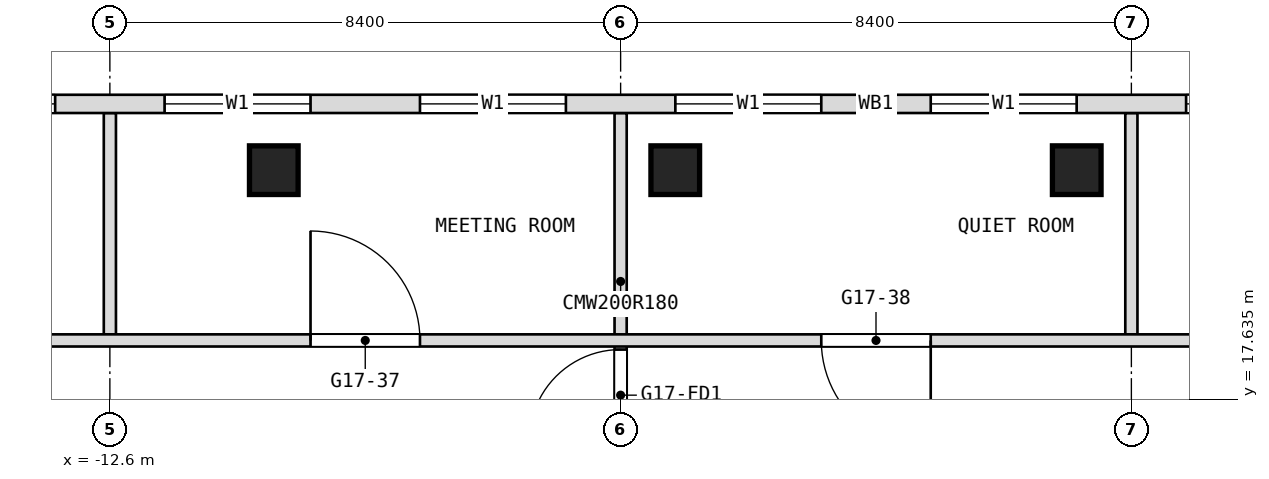
"""IFC4 building model, lengths in metres.
Left out: names, types, materials, properties, quantities, classifications, styles, units other than length and angle.
Written with IfcOpenShell. Run it as: python <this file> out.ifc"""

import sys

from ifc_helpers import new_model, si_unit, direction, frame, frame_2d, origin, origin_2d, place, context, subcontext, project, spatial, rectangle, extrude, element, fill, save


model = new_model("IFC4")
c1 = context("Model", 3, precision=1e-05, world=origin(), true_north=direction((0.0, 1.0)))
c2 = subcontext(c1, "Body", "Model", "MODEL_VIEW")
j1 = project(units=[si_unit("LENGTHUNIT", "METRE"), si_unit("PLANEANGLEUNIT", "RADIAN")], contexts=[c1])
p1 = place(None, origin())
s1 = spatial("IfcSite", under=j1, at=p1, CompositionType="ELEMENT")
p2 = place(p1, origin())
s2 = spatial("IfcBuilding", under=s1, at=p2, CompositionType="ELEMENT")
p3 = place(p2, frame((0.0, 0.0, 209.3)))
s3 = spatial("IfcBuildingStorey", under=s2, at=p3, CompositionType="ELEMENT", Elevation=209.3)
for number, where, z_axis, x_axis in (
    (1, (-9.904, 21.4, 0.0), (0.0, 0.0, 1.0), (1.0, 0.0, 0.0)),
    (2, (-3.302, 21.4, 0.0), (0.0, 0.0, 1.0), (1.0, 0.0, 0.0)),
    (3, (3.302, 21.4, 0.0), (0.0, 0.0, 1.0), (1.0, 0.0, 0.0)),
):
    element("IfcColumn", number, at=place(p3, frame(where, z_axis=z_axis, x_axis=x_axis)), inside=s3, PredefinedType="COLUMN", context=c2, shape_type="SweptSolid", body=[
        extrude(rectangle(XDim=0.8, YDim=0.8, at=origin_2d()), origin(), (0.0, 0.0, 1.0), 3.6),
    ])
p4 = place(p3, frame((4.2, 18.7, 0.0), z_axis=(0.0, 0.0, 1.0), x_axis=(0.0, 1.0, 0.0)))
e4 = element("IfcWall", 4, at=p4, inside=s3, PredefinedType="PARTITIONING", context=c2, shape_type="SweptSolid", body=[
    extrude(rectangle(XDim=3.64, YDim=0.2, at=frame_2d((1.82, 0.0))), origin(), (0.0, 0.0, 1.0), 3.34),
])
p5 = place(p3, frame((-4.2, 16.8, 0.0), z_axis=(0.0, 0.0, 1.0), x_axis=(0.0, 1.0, 0.0)))
e5 = element("IfcWall", 5, at=p5, inside=s3, PredefinedType="PARTITIONING", context=c2, shape_type="SweptSolid", body=[
    extrude(rectangle(XDim=5.54, YDim=0.2, at=frame_2d((2.77, 0.0))), origin(), (0.0, 0.0, 1.0), 3.34),
])
p6 = place(p5, frame((0.15, 0.0, 0.0)))
e6 = element("IfcOpeningElement", 6, at=p6, cuts=e5, PredefinedType="OPENING", context=c2, shape_type="SweptSolid", body=[
    extrude(rectangle(XDim=1.5, YDim=2.1, at=frame_2d((0.75, 1.05))), frame((0.0, 0.1, 0.0), z_axis=(0.0, -1.0, 0.0), x_axis=(1.0, 0.0, 0.0)), (0.0, 0.0, 1.0), 0.2),
])
p7 = place(p3, frame((-12.6, 18.7, 0.0), z_axis=(0.0, 0.0, 1.0), x_axis=(0.0, 1.0, 0.0)))
e7 = element("IfcWall", 7, at=p7, inside=s3, PredefinedType="PARTITIONING", context=c2, shape_type="SweptSolid", body=[
    extrude(rectangle(XDim=3.64, YDim=0.2, at=frame_2d((1.82, 0.0))), origin(), (0.0, 0.0, 1.0), 3.34),
])
p8 = place(p3, frame((-16.9, 18.6, 0.0), z_axis=(0.0, 0.0, 1.0), x_axis=(1.0, 0.0, 0.0)))
e8 = element("IfcWall", 8, at=p8, inside=s3, PredefinedType="PARTITIONING", context=c2, shape_type="SweptSolid", body=[
    extrude(rectangle(XDim=33.8, YDim=0.2, at=frame_2d((16.9, 0.0))), origin(), (0.0, 0.0, 1.0), 3.34),
])
p9 = place(p8, frame((1.7, 0.0, 0.0)))
e9 = element("IfcOpeningElement", 9, at=p9, cuts=e8, PredefinedType="OPENING", context=c2, shape_type="SweptSolid", body=[
    extrude(rectangle(XDim=1.0, YDim=2.1, at=frame_2d((0.5, 1.05))), frame((0.0, 0.1, 0.0), z_axis=(0.0, -1.0, 0.0), x_axis=(1.0, 0.0, 0.0)), (0.0, 0.0, 1.0), 0.2),
])
p10 = place(p8, frame((7.6, 0.0, 0.0)))
e10 = element("IfcOpeningElement", 10, at=p10, cuts=e8, PredefinedType="OPENING", context=c2, shape_type="SweptSolid", body=[
    extrude(rectangle(XDim=1.8, YDim=2.1, at=frame_2d((0.9, 1.05))), frame((0.0, 0.1, 0.0), z_axis=(0.0, -1.0, 0.0), x_axis=(1.0, 0.0, 0.0)), (0.0, 0.0, 1.0), 0.2),
])
p11 = place(p8, frame((16.0, 0.0, 0.0)))
e11 = element("IfcOpeningElement", 11, at=p11, cuts=e8, PredefinedType="OPENING", context=c2, shape_type="SweptSolid", body=[
    extrude(rectangle(XDim=1.8, YDim=2.1, at=frame_2d((0.9, 1.05))), frame((0.0, 0.1, 0.0), z_axis=(0.0, -1.0, 0.0), x_axis=(1.0, 0.0, 0.0)), (0.0, 0.0, 1.0), 0.2),
])
p12 = place(p8, frame((24.4, 0.0, 0.0)))
e12 = element("IfcOpeningElement", 12, at=p12, cuts=e8, PredefinedType="OPENING", context=c2, shape_type="SweptSolid", body=[
    extrude(rectangle(XDim=1.8, YDim=2.1, at=frame_2d((0.9, 1.05))), frame((0.0, 0.1, 0.0), z_axis=(0.0, -1.0, 0.0), x_axis=(1.0, 0.0, 0.0)), (0.0, 0.0, 1.0), 0.2),
])
p13 = place(p8, frame((31.1, 0.0, 0.0)))
e13 = element("IfcOpeningElement", 13, at=p13, cuts=e8, PredefinedType="OPENING", context=c2, shape_type="SweptSolid", body=[
    extrude(rectangle(XDim=1.0, YDim=2.1, at=frame_2d((0.5, 1.05))), frame((0.0, 0.1, 0.0), z_axis=(0.0, -1.0, 0.0), x_axis=(1.0, 0.0, 0.0)), (0.0, 0.0, 1.0), 0.2),
])
p14 = place(p3, frame((19.206, 22.49, 0.0), z_axis=(0.0, 0.0, 1.0), x_axis=(-1.0, 0.0, 0.0)))
e14 = element("IfcWall", 14, at=p14, inside=s3, PredefinedType="NOTDEFINED", context=c2, shape_type="SweptSolid", body=[
    extrude(rectangle(XDim=38.412, YDim=0.3, at=frame_2d((19.206, 0.0))), origin(), (0.0, 0.0, 1.0), 3.6),
])
p15 = place(p14, frame((3.306, 0.0, 0.9)))
e15 = element("IfcOpeningElement", 15, at=p15, cuts=e14, PredefinedType="OPENING", context=c2, shape_type="SweptSolid", body=[
    extrude(rectangle(XDim=2.4, YDim=2.1, at=frame_2d((1.2, 1.05))), frame((0.0, 0.15, 0.0), z_axis=(0.0, -1.0, 0.0), x_axis=(1.0, 0.0, 0.0)), (0.0, 0.0, 1.0), 0.3),
])
p16 = place(p14, frame((7.506, 0.0, 0.9)))
e16 = element("IfcOpeningElement", 16, at=p16, cuts=e14, PredefinedType="OPENING", context=c2, shape_type="SweptSolid", body=[
    extrude(rectangle(XDim=2.4, YDim=2.1, at=frame_2d((1.2, 1.05))), frame((0.0, 0.15, 0.0), z_axis=(0.0, -1.0, 0.0), x_axis=(1.0, 0.0, 0.0)), (0.0, 0.0, 1.0), 0.3),
])
p17 = place(p14, frame((11.706, 0.0, 0.9)))
e17 = element("IfcOpeningElement", 17, at=p17, cuts=e14, PredefinedType="OPENING", context=c2, shape_type="SweptSolid", body=[
    extrude(rectangle(XDim=2.4, YDim=2.1, at=frame_2d((1.2, 1.05))), frame((0.0, 0.15, 0.0), z_axis=(0.0, -1.0, 0.0), x_axis=(1.0, 0.0, 0.0)), (0.0, 0.0, 1.0), 0.3),
])
p18 = place(p14, frame((15.906, 0.0, 0.9)))
e18 = element("IfcOpeningElement", 18, at=p18, cuts=e14, PredefinedType="OPENING", context=c2, shape_type="SweptSolid", body=[
    extrude(rectangle(XDim=2.4, YDim=2.1, at=frame_2d((1.2, 1.05))), frame((0.0, 0.15, 0.0), z_axis=(0.0, -1.0, 0.0), x_axis=(1.0, 0.0, 0.0)), (0.0, 0.0, 1.0), 0.3),
])
p19 = place(p14, frame((20.106, 0.0, 0.9)))
e19 = element("IfcOpeningElement", 19, at=p19, cuts=e14, PredefinedType="OPENING", context=c2, shape_type="SweptSolid", body=[
    extrude(rectangle(XDim=2.4, YDim=2.1, at=frame_2d((1.2, 1.05))), frame((0.0, 0.15, 0.0), z_axis=(0.0, -1.0, 0.0), x_axis=(1.0, 0.0, 0.0)), (0.0, 0.0, 1.0), 0.3),
])
p20 = place(p14, frame((24.306, 0.0, 0.9)))
e20 = element("IfcOpeningElement", 20, at=p20, cuts=e14, PredefinedType="OPENING", context=c2, shape_type="SweptSolid", body=[
    extrude(rectangle(XDim=2.4, YDim=2.1, at=frame_2d((1.2, 1.05))), frame((0.0, 0.15, 0.0), z_axis=(0.0, -1.0, 0.0), x_axis=(1.0, 0.0, 0.0)), (0.0, 0.0, 1.0), 0.3),
])
p21 = place(p14, frame((28.506, 0.0, 0.9)))
e21 = element("IfcOpeningElement", 21, at=p21, cuts=e14, PredefinedType="OPENING", context=c2, shape_type="SweptSolid", body=[
    extrude(rectangle(XDim=2.4, YDim=2.1, at=frame_2d((1.2, 1.05))), frame((0.0, 0.15, 0.0), z_axis=(0.0, -1.0, 0.0), x_axis=(1.0, 0.0, 0.0)), (0.0, 0.0, 1.0), 0.3),
])
p22 = place(p14, frame((32.706, 0.0, 0.9)))
e22 = element("IfcOpeningElement", 22, at=p22, cuts=e14, PredefinedType="OPENING", context=c2, shape_type="SweptSolid", body=[
    extrude(rectangle(XDim=2.4, YDim=2.1, at=frame_2d((1.2, 1.05))), frame((0.0, 0.15, 0.0), z_axis=(0.0, -1.0, 0.0), x_axis=(1.0, 0.0, 0.0)), (0.0, 0.0, 1.0), 0.3),
])
p23 = place(p10, origin())
e23 = element("IfcDoor", 23, at=p23, inside=s3, OperationType="DOUBLE_DOOR_SINGLE_SWING", PredefinedType="DOOR", context=c2, shape_type="SweptSolid", body=[
    extrude(rectangle(XDim=1.8, YDim=2.1, at=frame_2d((0.9, 1.05))), frame((0.0, 0.025, 0.0), z_axis=(0.0, -1.0, 0.0), x_axis=(1.0, 0.0, 0.0)), (0.0, 0.0, 1.0), 0.05),
])
fill(e10, e23)
p24 = place(p11, origin())
e24 = element("IfcDoor", 24, at=p24, inside=s3, OperationType="DOUBLE_DOOR_SINGLE_SWING", PredefinedType="DOOR", context=c2, shape_type="SweptSolid", body=[
    extrude(rectangle(XDim=1.8, YDim=2.1, at=frame_2d((0.9, 1.05))), frame((0.0, 0.025, 0.0), z_axis=(0.0, -1.0, 0.0), x_axis=(1.0, 0.0, 0.0)), (0.0, 0.0, 1.0), 0.05),
])
fill(e11, e24)
p25 = place(p17, origin())
e25 = element("IfcWindow", 25, at=p25, inside=s3, PartitioningType="SINGLE_PANEL", PredefinedType="WINDOW", context=c2, shape_type="SweptSolid", body=[
    extrude(rectangle(XDim=2.4, YDim=2.1, at=frame_2d((1.2, 1.05))), frame((0.0, 0.03, 0.0), z_axis=(0.0, -1.0, 0.0), x_axis=(1.0, 0.0, 0.0)), (0.0, 0.0, 1.0), 0.06),
])
fill(e17, e25)
p26 = place(p18, origin())
e26 = element("IfcWindow", 26, at=p26, inside=s3, PartitioningType="SINGLE_PANEL", PredefinedType="WINDOW", context=c2, shape_type="SweptSolid", body=[
    extrude(rectangle(XDim=2.4, YDim=2.1, at=frame_2d((1.2, 1.05))), frame((0.0, 0.03, 0.0), z_axis=(0.0, -1.0, 0.0), x_axis=(1.0, 0.0, 0.0)), (0.0, 0.0, 1.0), 0.06),
])
fill(e18, e26)
p27 = place(p19, origin())
e27 = element("IfcWindow", 27, at=p27, inside=s3, PartitioningType="SINGLE_PANEL", PredefinedType="WINDOW", context=c2, shape_type="SweptSolid", body=[
    extrude(rectangle(XDim=2.4, YDim=2.1, at=frame_2d((1.2, 1.05))), frame((0.0, 0.03, 0.0), z_axis=(0.0, -1.0, 0.0), x_axis=(1.0, 0.0, 0.0)), (0.0, 0.0, 1.0), 0.06),
])
fill(e19, e27)
p28 = place(p20, origin())
e28 = element("IfcWindow", 28, at=p28, inside=s3, PartitioningType="SINGLE_PANEL", PredefinedType="WINDOW", context=c2, shape_type="SweptSolid", body=[
    extrude(rectangle(XDim=2.4, YDim=2.1, at=frame_2d((1.2, 1.05))), frame((0.0, 0.03, 0.0), z_axis=(0.0, -1.0, 0.0), x_axis=(1.0, 0.0, 0.0)), (0.0, 0.0, 1.0), 0.06),
])
fill(e20, e28)
p29 = place(p21, origin())
e29 = element("IfcWindow", 29, at=p29, inside=s3, PartitioningType="SINGLE_PANEL", PredefinedType="WINDOW", context=c2, shape_type="SweptSolid", body=[
    extrude(rectangle(XDim=2.4, YDim=2.1, at=frame_2d((1.2, 1.05))), frame((0.0, 0.03, 0.0), z_axis=(0.0, -1.0, 0.0), x_axis=(1.0, 0.0, 0.0)), (0.0, 0.0, 1.0), 0.06),
])
fill(e21, e29)
p30 = place(p22, origin())
e30 = element("IfcWindow", 30, at=p30, inside=s3, PartitioningType="SINGLE_PANEL", PredefinedType="WINDOW", context=c2, shape_type="SweptSolid", body=[
    extrude(rectangle(XDim=2.4, YDim=2.1, at=frame_2d((1.2, 1.05))), frame((0.0, 0.03, 0.0), z_axis=(0.0, -1.0, 0.0), x_axis=(1.0, 0.0, 0.0)), (0.0, 0.0, 1.0), 0.06),
])
fill(e22, e30)
p31 = place(p6, origin())
e31 = element("IfcDoor", 31, at=p31, inside=s3, OperationType="DOUBLE_DOOR_DOUBLE_SWING", PredefinedType="DOOR", context=c2, shape_type="SweptSolid", body=[
    extrude(rectangle(XDim=1.5, YDim=2.1, at=frame_2d((0.75, 1.05))), frame((0.0, 0.025, 0.0), z_axis=(0.0, -1.0, 0.0), x_axis=(1.0, 0.0, 0.0)), (0.0, 0.0, 1.0), 0.05),
])
fill(e6, e31)
save(model, sys.argv[1])
